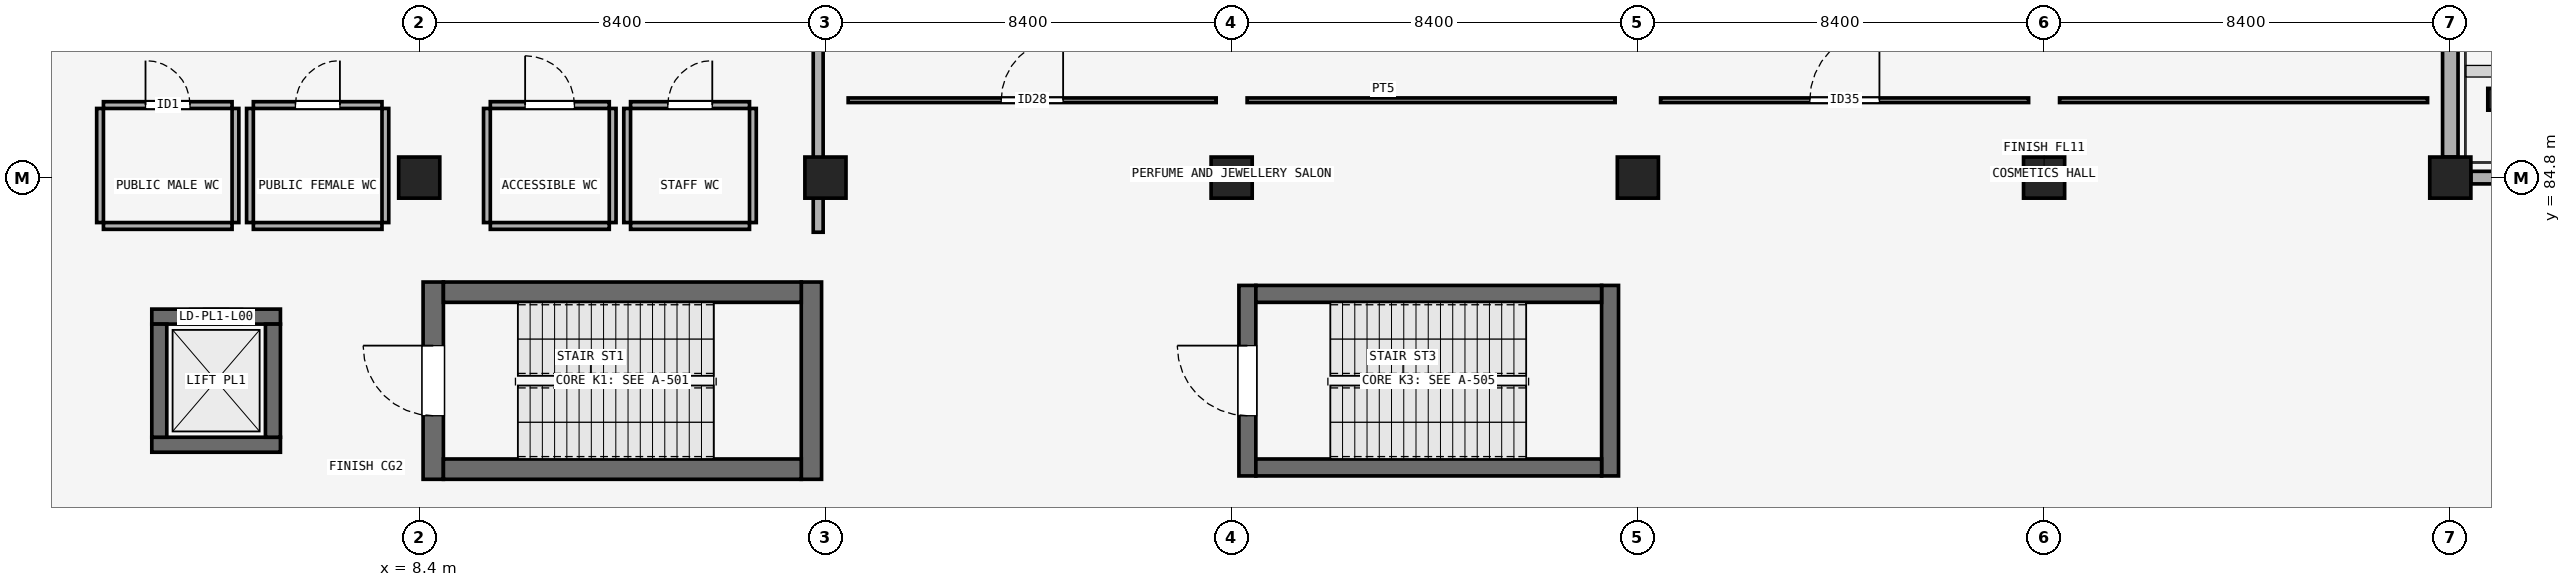
"""IFC4 building model, lengths in metres.
Left out: names, types, materials, properties, quantities, classifications, styles, units other than length and angle.
Written with IfcOpenShell. Run it as: python <this file> out.ifc"""

import sys

from ifc_helpers import new_model, si_unit, direction, frame, frame_2d, origin, origin_2d, place, context, subcontext, project, spatial, rectangle, extrude, element, fill, save


model = new_model("IFC4")
c1 = context("Model", 3, precision=1e-05, world=origin(), true_north=direction((0.0, 1.0)))
c2 = subcontext(c1, "Body", "Model", "MODEL_VIEW")
j1 = project(units=[si_unit("LENGTHUNIT", "METRE"), si_unit("PLANEANGLEUNIT", "RADIAN")], contexts=[c1])
p1 = place(None, origin())
s1 = spatial("IfcSite", under=j1, at=p1, CompositionType="ELEMENT")
p2 = place(p1, origin())
s2 = spatial("IfcBuilding", under=s1, at=p2, CompositionType="ELEMENT")
p3 = place(p2, origin())
s3 = spatial("IfcBuildingStorey", under=s2, at=p3, CompositionType="ELEMENT", Elevation=0.0)
for number, where, z_axis, x_axis in (
    (1, (8.4, 84.8, 0.0), (0.0, 0.0, 1.0), (1.0, 0.0, 0.0)),
    (2, (16.8, 84.8, 0.0), (0.0, 0.0, 1.0), (1.0, 0.0, 0.0)),
    (3, (25.2, 84.8, 0.0), (0.0, 0.0, 1.0), (1.0, 0.0, 0.0)),
    (4, (33.6, 84.8, 0.0), (0.0, 0.0, 1.0), (1.0, 0.0, 0.0)),
    (5, (42.0, 84.8, 0.0), (0.0, 0.0, 1.0), (1.0, 0.0, 0.0)),
    (6, (50.4, 84.8, 0.0), (0.0, 0.0, 1.0), (1.0, 0.0, 0.0)),
):
    element("IfcColumn", number, at=place(p3, frame(where, z_axis=z_axis, x_axis=x_axis)), inside=s3, PredefinedType="COLUMN", context=c2, shape_type="SweptSolid", body=[
        extrude(rectangle(XDim=0.85, YDim=0.85, at=origin_2d()), origin(), (0.0, 0.0, 1.0), 5.4),
    ])
p4 = place(p3, frame((51.45, 86.42, 0.0), z_axis=(0.0, 0.0, 1.0), x_axis=(0.0, 1.0, 0.0)))
e7 = element("IfcColumn", 7, at=p4, inside=s3, PredefinedType="PILASTER", context=c2, shape_type="SweptSolid", body=[
    extrude(rectangle(XDim=0.45, YDim=0.55, at=origin_2d()), origin(), (0.0, 0.0, 1.0), 5.4),
])
p5 = place(p3, frame((50.825, 84.8, 0.0), z_axis=(0.0, 0.0, 1.0), x_axis=(1.0, 0.0, 0.0)))
e8 = element("IfcWall", 8, at=p5, inside=s3, PredefinedType="SOLIDWALL", context=c2, shape_type="SweptSolid", body=[
    extrude(rectangle(XDim=7.55, YDim=0.26, at=frame_2d((3.775, 0.0))), origin(), (0.0, 0.0, 1.0), 4.35),
])
p6 = place(p5, frame((2.675, 0.0, 0.0)))
e9 = element("IfcOpeningElement", 9, at=p6, cuts=e8, PredefinedType="OPENING", context=c2, shape_type="SweptSolid", body=[
    extrude(rectangle(XDim=2.2, YDim=2.55, at=frame_2d((1.1, 1.275))), frame((0.0, 0.14, 0.0), z_axis=(0.0, -1.0, 0.0), x_axis=(1.0, 0.0, 0.0)), (0.0, 0.0, 1.0), 0.28),
])
p7 = place(p3, frame((50.4, 85.225, 0.0), z_axis=(0.0, 0.0, 1.0), x_axis=(0.0, 1.0, 0.0)))
e10 = element("IfcWall", 10, at=p7, inside=s3, PredefinedType="SOLIDWALL", context=c2, shape_type="SweptSolid", body=[
    extrude(rectangle(XDim=7.55, YDim=0.32, at=frame_2d((3.775, 0.0))), origin(), (0.0, 0.0, 1.0), 4.35),
])
p8 = place(p3, frame((8.69, 78.56, 0.0), z_axis=(0.0, 0.0, 1.0), x_axis=(0.0, 1.0, 0.0)))
e11 = element("IfcWall", 11, at=p8, inside=s3, PredefinedType="SHEAR", context=c2, shape_type="SweptSolid", body=[
    extrude(rectangle(XDim=4.08, YDim=0.42, at=frame_2d((2.04, 0.0))), origin(), (0.0, 0.0, 1.0), 5.1),
])
p9 = place(p8, frame((1.315, 0.0, 0.0)))
e12 = element("IfcOpeningElement", 12, at=p9, cuts=e11, PredefinedType="OPENING", context=c2, shape_type="SweptSolid", body=[
    extrude(rectangle(XDim=1.45, YDim=2.2, at=frame_2d((0.725, 1.1))), frame((0.0, 0.22, 0.0), z_axis=(0.0, -1.0, 0.0), x_axis=(1.0, 0.0, 0.0)), (0.0, 0.0, 1.0), 0.44),
])
p10 = place(p3, frame((16.51, 78.56, 0.0), z_axis=(0.0, 0.0, 1.0), x_axis=(0.0, 1.0, 0.0)))
e13 = element("IfcWall", 13, at=p10, inside=s3, PredefinedType="SHEAR", context=c2, shape_type="SweptSolid", body=[
    extrude(rectangle(XDim=4.08, YDim=0.42, at=frame_2d((2.04, 0.0))), origin(), (0.0, 0.0, 1.0), 5.1),
])
for number, where, z_axis, x_axis in (
    (14, (8.9, 78.77, 0.0), (0.0, 0.0, 1.0), (1.0, 0.0, 0.0)),
    (15, (8.9, 82.43, 0.0), (0.0, 0.0, 1.0), (1.0, 0.0, 0.0)),
):
    element("IfcWall", number, at=place(p3, frame(where, z_axis=z_axis, x_axis=x_axis)), inside=s3, PredefinedType="SHEAR", context=c2, shape_type="SweptSolid", body=[
        extrude(rectangle(XDim=7.4, YDim=0.42, at=frame_2d((3.7, 0.0))), origin(), (0.0, 0.0, 1.0), 5.1),
    ])
p11 = place(p3, frame((25.525, 78.63, 0.0), z_axis=(0.0, 0.0, 1.0), x_axis=(0.0, 1.0, 0.0)))
e16 = element("IfcWall", 16, at=p11, inside=s3, PredefinedType="SHEAR", context=c2, shape_type="SweptSolid", body=[
    extrude(rectangle(XDim=3.94, YDim=0.35, at=frame_2d((1.97, 0.0))), origin(), (0.0, 0.0, 1.0), 5.1),
])
p12 = place(p11, frame((1.245, 0.0, 0.0)))
e17 = element("IfcOpeningElement", 17, at=p12, cuts=e16, PredefinedType="OPENING", context=c2, shape_type="SweptSolid", body=[
    extrude(rectangle(XDim=1.45, YDim=2.2, at=frame_2d((0.725, 1.1))), frame((0.0, 0.185, 0.0), z_axis=(0.0, -1.0, 0.0), x_axis=(1.0, 0.0, 0.0)), (0.0, 0.0, 1.0), 0.37),
])
p13 = place(p3, frame((33.025, 78.63, 0.0), z_axis=(0.0, 0.0, 1.0), x_axis=(0.0, 1.0, 0.0)))
e18 = element("IfcWall", 18, at=p13, inside=s3, PredefinedType="SHEAR", context=c2, shape_type="SweptSolid", body=[
    extrude(rectangle(XDim=3.94, YDim=0.35, at=frame_2d((1.97, 0.0))), origin(), (0.0, 0.0, 1.0), 5.1),
])
for number, where, z_axis, x_axis in (
    (19, (25.7, 78.805, 0.0), (0.0, 0.0, 1.0), (1.0, 0.0, 0.0)),
    (20, (25.7, 82.395, 0.0), (0.0, 0.0, 1.0), (1.0, 0.0, 0.0)),
):
    element("IfcWall", number, at=place(p3, frame(where, z_axis=z_axis, x_axis=x_axis)), inside=s3, PredefinedType="SHEAR", context=c2, shape_type="SweptSolid", body=[
        extrude(rectangle(XDim=7.15, YDim=0.35, at=frame_2d((3.575, 0.0))), origin(), (0.0, 0.0, 1.0), 5.1),
    ])
p14 = place(p3, frame((2.87, 79.275, 0.0), z_axis=(0.0, 0.0, 1.0), x_axis=(1.0, 0.0, 0.0)))
e21 = element("IfcWall", 21, at=p14, inside=s3, PredefinedType="SHEAR", context=c2, shape_type="SweptSolid", body=[
    extrude(rectangle(XDim=2.66, YDim=0.31, at=frame_2d((1.33, 0.0))), origin(), (0.0, 0.0, 1.0), 5.1),
])
p15 = place(p3, frame((2.87, 81.925, 0.0), z_axis=(0.0, 0.0, 1.0), x_axis=(1.0, 0.0, 0.0)))
e22 = element("IfcWall", 22, at=p15, inside=s3, PredefinedType="SHEAR", context=c2, shape_type="SweptSolid", body=[
    extrude(rectangle(XDim=2.66, YDim=0.31, at=frame_2d((1.33, 0.0))), origin(), (0.0, 0.0, 1.0), 5.1),
])
p16 = place(p15, frame((0.78, 0.0, 0.0)))
e23 = element("IfcOpeningElement", 23, at=p16, cuts=e22, PredefinedType="OPENING", context=c2, shape_type="SweptSolid", body=[
    extrude(rectangle(XDim=1.1, YDim=2.2, at=frame_2d((0.55, 1.1))), frame((0.0, 0.165, 0.0), z_axis=(0.0, -1.0, 0.0), x_axis=(1.0, 0.0, 0.0)), (0.0, 0.0, 1.0), 0.33),
])
for number, where, z_axis, x_axis in (
    (24, (3.025, 79.43, 0.0), (0.0, 0.0, 1.0), (0.0, 1.0, 0.0)),
    (25, (5.375, 79.43, 0.0), (0.0, 0.0, 1.0), (0.0, 1.0, 0.0)),
):
    element("IfcWall", number, at=place(p3, frame(where, z_axis=z_axis, x_axis=x_axis)), inside=s3, PredefinedType="SHEAR", context=c2, shape_type="SweptSolid", body=[
        extrude(rectangle(XDim=2.34, YDim=0.31, at=frame_2d((1.17, 0.0))), origin(), (0.0, 0.0, 1.0), 5.1),
    ])
p17 = place(p3, frame((1.87, 86.3, 0.0), z_axis=(0.0, 0.0, 1.0), x_axis=(1.0, 0.0, 0.0)))
e26 = element("IfcWall", 26, at=p17, inside=s3, PredefinedType="PARTITIONING", context=c2, shape_type="SweptSolid", body=[
    extrude(rectangle(XDim=2.66, YDim=0.14, at=frame_2d((1.33, 0.0))), origin(), (0.0, 0.0, 1.0), 5.1),
])
p18 = place(p17, frame((0.87, 0.0, 0.0)))
e27 = element("IfcOpeningElement", 27, at=p18, cuts=e26, PredefinedType="OPENING", context=c2, shape_type="SweptSolid", body=[
    extrude(rectangle(XDim=0.92, YDim=2.12, at=frame_2d((0.46, 1.06))), frame((0.0, 0.08, 0.0), z_axis=(0.0, -1.0, 0.0), x_axis=(1.0, 0.0, 0.0)), (0.0, 0.0, 1.0), 0.16),
])
p19 = place(p3, frame((1.87, 83.8, 0.0), z_axis=(0.0, 0.0, 1.0), x_axis=(1.0, 0.0, 0.0)))
e28 = element("IfcWall", 28, at=p19, inside=s3, PredefinedType="PARTITIONING", context=c2, shape_type="SweptSolid", body=[
    extrude(rectangle(XDim=2.66, YDim=0.14, at=frame_2d((1.33, 0.0))), origin(), (0.0, 0.0, 1.0), 5.1),
])
for number, where, z_axis, x_axis in (
    (29, (1.8, 83.87, 0.0), (0.0, 0.0, 1.0), (0.0, 1.0, 0.0)),
    (30, (4.6, 83.87, 0.0), (0.0, 0.0, 1.0), (0.0, 1.0, 0.0)),
):
    element("IfcWall", number, at=place(p3, frame(where, z_axis=z_axis, x_axis=x_axis)), inside=s3, PredefinedType="PARTITIONING", context=c2, shape_type="SweptSolid", body=[
        extrude(rectangle(XDim=2.36, YDim=0.14, at=frame_2d((1.18, 0.0))), origin(), (0.0, 0.0, 1.0), 4.35),
    ])
p20 = place(p3, frame((4.97, 86.3, 0.0), z_axis=(0.0, 0.0, 1.0), x_axis=(1.0, 0.0, 0.0)))
e31 = element("IfcWall", 31, at=p20, inside=s3, PredefinedType="PARTITIONING", context=c2, shape_type="SweptSolid", body=[
    extrude(rectangle(XDim=2.66, YDim=0.14, at=frame_2d((1.33, 0.0))), origin(), (0.0, 0.0, 1.0), 5.1),
])
p21 = place(p20, frame((0.87, 0.0, 0.0)))
e32 = element("IfcOpeningElement", 32, at=p21, cuts=e31, PredefinedType="OPENING", context=c2, shape_type="SweptSolid", body=[
    extrude(rectangle(XDim=0.92, YDim=2.12, at=frame_2d((0.46, 1.06))), frame((0.0, 0.08, 0.0), z_axis=(0.0, -1.0, 0.0), x_axis=(1.0, 0.0, 0.0)), (0.0, 0.0, 1.0), 0.16),
])
p22 = place(p3, frame((4.97, 83.8, 0.0), z_axis=(0.0, 0.0, 1.0), x_axis=(1.0, 0.0, 0.0)))
e33 = element("IfcWall", 33, at=p22, inside=s3, PredefinedType="PARTITIONING", context=c2, shape_type="SweptSolid", body=[
    extrude(rectangle(XDim=2.66, YDim=0.14, at=frame_2d((1.33, 0.0))), origin(), (0.0, 0.0, 1.0), 5.1),
])
for number, where, z_axis, x_axis in (
    (34, (4.9, 83.87, 0.0), (0.0, 0.0, 1.0), (0.0, 1.0, 0.0)),
    (35, (7.7, 83.87, 0.0), (0.0, 0.0, 1.0), (0.0, 1.0, 0.0)),
):
    element("IfcWall", number, at=place(p3, frame(where, z_axis=z_axis, x_axis=x_axis)), inside=s3, PredefinedType="PARTITIONING", context=c2, shape_type="SweptSolid", body=[
        extrude(rectangle(XDim=2.36, YDim=0.14, at=frame_2d((1.18, 0.0))), origin(), (0.0, 0.0, 1.0), 4.35),
    ])
p23 = place(p3, frame((9.87, 86.3, 0.0), z_axis=(0.0, 0.0, 1.0), x_axis=(1.0, 0.0, 0.0)))
e36 = element("IfcWall", 36, at=p23, inside=s3, PredefinedType="PARTITIONING", context=c2, shape_type="SweptSolid", body=[
    extrude(rectangle(XDim=2.46, YDim=0.14, at=frame_2d((1.23, 0.0))), origin(), (0.0, 0.0, 1.0), 5.1),
])
p24 = place(p23, frame((0.72, 0.0, 0.0)))
e37 = element("IfcOpeningElement", 37, at=p24, cuts=e36, PredefinedType="OPENING", context=c2, shape_type="SweptSolid", body=[
    extrude(rectangle(XDim=1.02, YDim=2.15, at=frame_2d((0.51, 1.075))), frame((0.0, 0.08, 0.0), z_axis=(0.0, -1.0, 0.0), x_axis=(1.0, 0.0, 0.0)), (0.0, 0.0, 1.0), 0.16),
])
p25 = place(p3, frame((9.87, 83.8, 0.0), z_axis=(0.0, 0.0, 1.0), x_axis=(1.0, 0.0, 0.0)))
e38 = element("IfcWall", 38, at=p25, inside=s3, PredefinedType="PARTITIONING", context=c2, shape_type="SweptSolid", body=[
    extrude(rectangle(XDim=2.46, YDim=0.14, at=frame_2d((1.23, 0.0))), origin(), (0.0, 0.0, 1.0), 5.1),
])
for number, where, z_axis, x_axis in (
    (39, (9.8, 83.87, 0.0), (0.0, 0.0, 1.0), (0.0, 1.0, 0.0)),
    (40, (12.4, 83.87, 0.0), (0.0, 0.0, 1.0), (0.0, 1.0, 0.0)),
):
    element("IfcWall", number, at=place(p3, frame(where, z_axis=z_axis, x_axis=x_axis)), inside=s3, PredefinedType="PARTITIONING", context=c2, shape_type="SweptSolid", body=[
        extrude(rectangle(XDim=2.36, YDim=0.14, at=frame_2d((1.18, 0.0))), origin(), (0.0, 0.0, 1.0), 4.35),
    ])
p26 = place(p3, frame((12.77, 86.3, 0.0), z_axis=(0.0, 0.0, 1.0), x_axis=(1.0, 0.0, 0.0)))
e41 = element("IfcWall", 41, at=p26, inside=s3, PredefinedType="PARTITIONING", context=c2, shape_type="SweptSolid", body=[
    extrude(rectangle(XDim=2.46, YDim=0.14, at=frame_2d((1.23, 0.0))), origin(), (0.0, 0.0, 1.0), 5.1),
])
p27 = place(p26, frame((0.77, 0.0, 0.0)))
e42 = element("IfcOpeningElement", 42, at=p27, cuts=e41, PredefinedType="OPENING", context=c2, shape_type="SweptSolid", body=[
    extrude(rectangle(XDim=0.92, YDim=2.12, at=frame_2d((0.46, 1.06))), frame((0.0, 0.08, 0.0), z_axis=(0.0, -1.0, 0.0), x_axis=(1.0, 0.0, 0.0)), (0.0, 0.0, 1.0), 0.16),
])
p28 = place(p3, frame((12.77, 83.8, 0.0), z_axis=(0.0, 0.0, 1.0), x_axis=(1.0, 0.0, 0.0)))
e43 = element("IfcWall", 43, at=p28, inside=s3, PredefinedType="PARTITIONING", context=c2, shape_type="SweptSolid", body=[
    extrude(rectangle(XDim=2.46, YDim=0.14, at=frame_2d((1.23, 0.0))), origin(), (0.0, 0.0, 1.0), 5.1),
])
for number, where, z_axis, x_axis in (
    (44, (12.7, 83.87, 0.0), (0.0, 0.0, 1.0), (0.0, 1.0, 0.0)),
    (45, (15.3, 83.87, 0.0), (0.0, 0.0, 1.0), (0.0, 1.0, 0.0)),
):
    element("IfcWall", number, at=place(p3, frame(where, z_axis=z_axis, x_axis=x_axis)), inside=s3, PredefinedType="PARTITIONING", context=c2, shape_type="SweptSolid", body=[
        extrude(rectangle(XDim=2.36, YDim=0.14, at=frame_2d((1.18, 0.0))), origin(), (0.0, 0.0, 1.0), 4.35),
    ])
p29 = place(p3, frame((16.65, 83.67, 0.0), z_axis=(0.0, 0.0, 1.0), x_axis=(0.0, 1.0, 0.0)))
e46 = element("IfcWall", 46, at=p29, inside=s3, PredefinedType="PARTITIONING", context=c2, shape_type="SweptSolid", body=[
    extrude(rectangle(XDim=11.86, YDim=0.205, at=frame_2d((5.93, 0.0))), origin(), (0.0, 0.0, 1.0), 4.35),
])
p30 = place(p29, frame((5.34, 0.0, 0.0)))
e47 = element("IfcOpeningElement", 47, at=p30, cuts=e46, PredefinedType="OPENING", context=c2, shape_type="SweptSolid", body=[
    extrude(rectangle(XDim=1.18, YDim=2.22, at=frame_2d((0.59, 1.11))), frame((0.0, 0.113, 0.0), z_axis=(0.0, -1.0, 0.0), x_axis=(1.0, 0.0, 0.0)), (0.0, 0.0, 1.0), 0.225),
])
p31 = place(p3, frame((17.27, 86.4, 0.0), z_axis=(0.0, 0.0, 1.0), x_axis=(1.0, 0.0, 0.0)))
e48 = element("IfcWall", 48, at=p31, inside=s3, PredefinedType="PARTITIONING", context=c2, shape_type="SweptSolid", body=[
    extrude(rectangle(XDim=7.61, YDim=0.095, at=frame_2d((3.805, 0.0))), origin(), (0.0, 0.0, 1.0), 5.1),
])
p32 = place(p31, frame((3.165, 0.0, 0.0)))
e49 = element("IfcOpeningElement", 49, at=p32, cuts=e48, PredefinedType="OPENING", context=c2, shape_type="SweptSolid", body=[
    extrude(rectangle(XDim=1.28, YDim=2.22, at=frame_2d((0.64, 1.11))), frame((0.0, 0.057, 0.0), z_axis=(0.0, -1.0, 0.0), x_axis=(1.0, 0.0, 0.0)), (0.0, 0.0, 1.0), 0.115),
])
p33 = place(p3, frame((25.52, 86.4, 0.0), z_axis=(0.0, 0.0, 1.0), x_axis=(1.0, 0.0, 0.0)))
e50 = element("IfcWall", 50, at=p33, inside=s3, PredefinedType="PARTITIONING", context=c2, shape_type="SweptSolid", body=[
    extrude(rectangle(XDim=7.61, YDim=0.095, at=frame_2d((3.805, 0.0))), origin(), (0.0, 0.0, 1.0), 5.1),
])
p34 = place(p3, frame((34.07, 86.4, 0.0), z_axis=(0.0, 0.0, 1.0), x_axis=(1.0, 0.0, 0.0)))
e51 = element("IfcWall", 51, at=p34, inside=s3, PredefinedType="PARTITIONING", context=c2, shape_type="SweptSolid", body=[
    extrude(rectangle(XDim=7.61, YDim=0.095, at=frame_2d((3.805, 0.0))), origin(), (0.0, 0.0, 1.0), 5.1),
])
p35 = place(p34, frame((3.085, 0.0, 0.0)))
e52 = element("IfcOpeningElement", 52, at=p35, cuts=e51, PredefinedType="OPENING", context=c2, shape_type="SweptSolid", body=[
    extrude(rectangle(XDim=1.44, YDim=2.1, at=frame_2d((0.72, 1.05))), frame((0.0, 0.057, 0.0), z_axis=(0.0, -1.0, 0.0), x_axis=(1.0, 0.0, 0.0)), (0.0, 0.0, 1.0), 0.115),
])
p36 = place(p3, frame((42.32, 86.4, 0.0), z_axis=(0.0, 0.0, 1.0), x_axis=(1.0, 0.0, 0.0)))
e53 = element("IfcWall", 53, at=p36, inside=s3, PredefinedType="PARTITIONING", context=c2, shape_type="SweptSolid", body=[
    extrude(rectangle(XDim=7.61, YDim=0.095, at=frame_2d((3.805, 0.0))), origin(), (0.0, 0.0, 1.0), 5.1),
])
p37 = place(p9, origin())
e54 = element("IfcDoor", 54, at=p37, inside=s3, OperationType="SINGLE_SWING_RIGHT", PredefinedType="DOOR", context=c2, shape_type="SweptSolid", body=[
    extrude(rectangle(XDim=1.45, YDim=2.2, at=frame_2d((0.725, 1.1))), frame((0.0, 0.025, 0.0), z_axis=(0.0, -1.0, 0.0), x_axis=(1.0, 0.0, 0.0)), (0.0, 0.0, 1.0), 0.05),
])
fill(e12, e54)
p38 = place(p12, origin())
e55 = element("IfcDoor", 55, at=p38, inside=s3, OperationType="SINGLE_SWING_RIGHT", PredefinedType="DOOR", context=c2, shape_type="SweptSolid", body=[
    extrude(rectangle(XDim=1.45, YDim=2.2, at=frame_2d((0.725, 1.1))), frame((0.0, 0.025, 0.0), z_axis=(0.0, -1.0, 0.0), x_axis=(1.0, 0.0, 0.0)), (0.0, 0.0, 1.0), 0.05),
])
fill(e17, e55)
p39 = place(p16, origin())
e56 = element("IfcDoor", 56, at=p39, inside=s3, OperationType="SLIDING_TO_LEFT", PredefinedType="DOOR", context=c2, shape_type="SweptSolid", body=[
    extrude(rectangle(XDim=1.1, YDim=2.2, at=frame_2d((0.55, 1.1))), frame((0.0, 0.025, 0.0), z_axis=(0.0, -1.0, 0.0), x_axis=(1.0, 0.0, 0.0)), (0.0, 0.0, 1.0), 0.05),
])
fill(e23, e56)
p40 = place(p18, origin())
e57 = element("IfcDoor", 57, at=p40, inside=s3, OperationType="SINGLE_SWING_LEFT", PredefinedType="DOOR", context=c2, shape_type="SweptSolid", body=[
    extrude(rectangle(XDim=0.92, YDim=2.12, at=frame_2d((0.46, 1.06))), frame((0.0, 0.025, 0.0), z_axis=(0.0, -1.0, 0.0), x_axis=(1.0, 0.0, 0.0)), (0.0, 0.0, 1.0), 0.05),
])
fill(e27, e57)
p41 = place(p21, origin())
e58 = element("IfcDoor", 58, at=p41, inside=s3, OperationType="SINGLE_SWING_RIGHT", PredefinedType="DOOR", context=c2, shape_type="SweptSolid", body=[
    extrude(rectangle(XDim=0.92, YDim=2.12, at=frame_2d((0.46, 1.06))), frame((0.0, 0.025, 0.0), z_axis=(0.0, -1.0, 0.0), x_axis=(1.0, 0.0, 0.0)), (0.0, 0.0, 1.0), 0.05),
])
fill(e32, e58)
p42 = place(p24, origin())
e59 = element("IfcDoor", 59, at=p42, inside=s3, OperationType="SINGLE_SWING_LEFT", PredefinedType="DOOR", context=c2, shape_type="SweptSolid", body=[
    extrude(rectangle(XDim=1.02, YDim=2.15, at=frame_2d((0.51, 1.075))), frame((0.0, 0.025, 0.0), z_axis=(0.0, -1.0, 0.0), x_axis=(1.0, 0.0, 0.0)), (0.0, 0.0, 1.0), 0.05),
])
fill(e37, e59)
p43 = place(p27, origin())
e60 = element("IfcDoor", 60, at=p43, inside=s3, OperationType="SINGLE_SWING_RIGHT", PredefinedType="DOOR", context=c2, shape_type="SweptSolid", body=[
    extrude(rectangle(XDim=0.92, YDim=2.12, at=frame_2d((0.46, 1.06))), frame((0.0, 0.025, 0.0), z_axis=(0.0, -1.0, 0.0), x_axis=(1.0, 0.0, 0.0)), (0.0, 0.0, 1.0), 0.05),
])
fill(e42, e60)
p44 = place(p32, origin())
e61 = element("IfcDoor", 61, at=p44, inside=s3, OperationType="SINGLE_SWING_RIGHT", PredefinedType="DOOR", context=c2, shape_type="SweptSolid", body=[
    extrude(rectangle(XDim=1.28, YDim=2.22, at=frame_2d((0.64, 1.11))), frame((0.0, 0.025, 0.0), z_axis=(0.0, -1.0, 0.0), x_axis=(1.0, 0.0, 0.0)), (0.0, 0.0, 1.0), 0.05),
])
fill(e49, e61)
p45 = place(p35, origin())
e62 = element("IfcDoor", 62, at=p45, inside=s3, OperationType="SINGLE_SWING_RIGHT", PredefinedType="DOOR", context=c2, shape_type="SweptSolid", body=[
    extrude(rectangle(XDim=1.44, YDim=2.1, at=frame_2d((0.72, 1.05))), frame((0.0, 0.025, 0.0), z_axis=(0.0, -1.0, 0.0), x_axis=(1.0, 0.0, 0.0)), (0.0, 0.0, 1.0), 0.05),
])
fill(e52, e62)
save(model, sys.argv[1])
